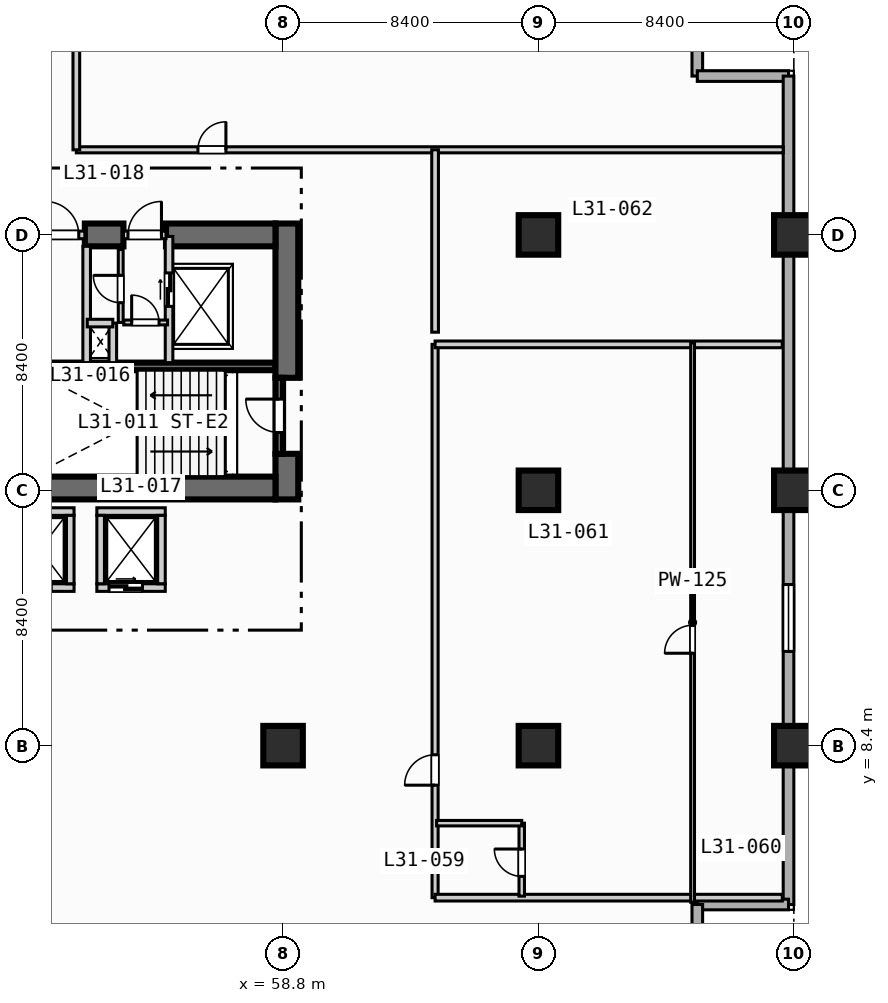
"""IFC4 building model, lengths in metres.
Left out: names, types, materials, properties, quantities, classifications, styles, units other than length and angle.
Written with IfcOpenShell. Run it as: python <this file> out.ifc"""

import sys

from ifc_helpers import new_model, si_unit, direction, frame, frame_2d, origin, origin_2d, place, context, subcontext, project, spatial, rectangle, extrude, element, fill, save


model = new_model("IFC4")
c1 = context("Model", 3, precision=1e-05, world=origin(), true_north=direction((0.0, 1.0)))
c2 = subcontext(c1, "Body", "Model", "MODEL_VIEW")
j1 = project(units=[si_unit("LENGTHUNIT", "METRE"), si_unit("PLANEANGLEUNIT", "RADIAN")], contexts=[c1])
p1 = place(None, origin())
s1 = spatial("IfcSite", under=j1, at=p1, CompositionType="ELEMENT")
p2 = place(p1, origin())
s2 = spatial("IfcBuilding", under=s1, at=p2, CompositionType="ELEMENT")
p3 = place(p2, frame((0.0, 0.0, 130.4)))
s3 = spatial("IfcBuildingStorey", under=s2, at=p3, CompositionType="ELEMENT", Elevation=130.4)
p4 = place(p3, frame((50.5, 20.875, 0.0), z_axis=(0.0, 0.0, 1.0), x_axis=(1.0, 0.0, 0.0)))
e1 = element("IfcWall", 1, at=p4, inside=s3, PredefinedType="SOLIDWALL", context=c2, shape_type="SweptSolid", body=[
    extrude(rectangle(XDim=8.05, YDim=0.25, at=frame_2d((4.025, 0.0))), origin(), (0.0, 0.0, 1.0), 3.55),
])
p5 = place(p3, frame((58.925, 16.5, 0.0), z_axis=(0.0, 0.0, 1.0), x_axis=(0.0, 1.0, 0.0)))
e2 = element("IfcWall", 2, at=p5, inside=s3, PredefinedType="SHEAR", context=c2, shape_type="SweptSolid", body=[
    extrude(rectangle(XDim=1.5, YDim=0.75, at=frame_2d((0.75, 0.0))), origin(), (0.0, 0.0, 1.0), 3.55),
])
p6 = place(p3, frame((58.925, 20.5, 0.0), z_axis=(0.0, 0.0, 1.0), x_axis=(0.0, 1.0, 0.0)))
e3 = element("IfcWall", 3, at=p6, inside=s3, PredefinedType="SHEAR", context=c2, shape_type="SweptSolid", body=[
    extrude(rectangle(XDim=5.075, YDim=0.75, at=frame_2d((2.538, 0.0))), origin(), (0.0, 0.0, 1.0), 3.55),
])
p7 = place(p3, frame((42.2, 16.875, 0.0), z_axis=(0.0, 0.0, 1.0), x_axis=(1.0, 0.0, 0.0)))
e4 = element("IfcWall", 4, at=p7, inside=s3, PredefinedType="SHEAR", context=c2, shape_type="SweptSolid", body=[
    extrude(rectangle(XDim=16.35, YDim=0.75, at=frame_2d((8.175, 0.0))), origin(), (0.0, 0.0, 1.0), 3.55),
])
p8 = place(p3, frame((52.28, 25.2, 0.0), z_axis=(0.0, 0.0, 1.0), x_axis=(1.0, 0.0, 0.0)))
e5 = element("IfcWall", 5, at=p8, inside=s3, PredefinedType="SHEAR", context=c2, shape_type="SweptSolid", body=[
    extrude(rectangle(XDim=1.27, YDim=0.75, at=frame_2d((0.635, 0.0))), origin(), (0.0, 0.0, 1.0), 3.55),
])
p9 = place(p3, frame((54.95, 25.2, 0.0), z_axis=(0.0, 0.0, 1.0), x_axis=(1.0, 0.0, 0.0)))
e6 = element("IfcWall", 6, at=p9, inside=s3, PredefinedType="SHEAR", context=c2, shape_type="SweptSolid", body=[
    extrude(rectangle(XDim=3.6, YDim=0.75, at=frame_2d((1.8, 0.0))), origin(), (0.0, 0.0, 1.0), 3.55),
])
for number, where, z_axis, x_axis in (
    (7, (58.8, 8.4, 0.0), (0.0, 0.0, 1.0), (1.0, 0.0, 0.0)),
    (8, (67.2, 8.4, 0.0), (0.0, 0.0, 1.0), (1.0, 0.0, 0.0)),
    (9, (67.2, 16.8, 0.0), (0.0, 0.0, 1.0), (1.0, 0.0, 0.0)),
    (10, (67.2, 25.2, 0.0), (0.0, 0.0, 1.0), (1.0, 0.0, 0.0)),
    (11, (75.6, 8.4, 0.0), (0.0, 0.0, 1.0), (1.0, 0.0, 0.0)),
    (12, (75.6, 16.8, 0.0), (0.0, 0.0, 1.0), (1.0, 0.0, 0.0)),
    (13, (75.6, 25.2, 0.0), (0.0, 0.0, 1.0), (1.0, 0.0, 0.0)),
):
    element("IfcColumn", number, at=place(p3, frame(where, z_axis=z_axis, x_axis=x_axis)), inside=s3, PredefinedType="COLUMN", context=c2, shape_type="SweptSolid", body=[
        extrude(rectangle(XDim=1.3, YDim=1.3, at=origin_2d()), origin(), (0.0, 0.0, 1.0), 3.8),
    ])
for number, where, z_axis, x_axis in (
    (14, (72.425, 33.425, 0.0), (0.0, 0.0, 1.0), (0.0, -1.0, 0.0)),
    (15, (72.425, 30.425, 0.0), (0.0, 0.0, 1.0), (1.0, 0.0, 0.0)),
):
    element("IfcWall", number, at=place(p3, frame(where, z_axis=z_axis, x_axis=x_axis)), inside=s3, PredefinedType="STANDARD", context=c2, shape_type="SweptSolid", body=[
        extrude(rectangle(XDim=3.0, YDim=0.35, at=frame_2d((1.5, 0.0))), origin(), (0.0, 0.0, 1.0), 3.55),
    ])
p10 = place(p3, frame((75.425, 30.425, 0.0), z_axis=(0.0, 0.0, 1.0), x_axis=(0.0, -1.0, 0.0)))
e16 = element("IfcWall", 16, at=p10, inside=s3, PredefinedType="STANDARD", context=c2, shape_type="SweptSolid", body=[
    extrude(rectangle(XDim=27.25, YDim=0.35, at=frame_2d((13.625, 0.0))), origin(), (0.0, 0.0, 1.0), 3.55),
])
p11 = place(p10, frame((16.725, 0.0, 0.85)))
e17 = element("IfcOpeningElement", 17, at=p11, cuts=e16, PredefinedType="OPENING", context=c2, shape_type="SweptSolid", body=[
    extrude(rectangle(XDim=2.2, YDim=1.8, at=frame_2d((1.1, 0.9))), frame((0.0, 0.185, 0.0), z_axis=(0.0, -1.0, 0.0), x_axis=(1.0, 0.0, 0.0)), (0.0, 0.0, 1.0), 0.37),
])
for number, where, z_axis, x_axis in (
    (18, (75.425, 3.175, 0.0), (0.0, 0.0, 1.0), (-1.0, 0.0, 0.0)),
    (19, (72.425, 3.175, 0.0), (0.0, 0.0, 1.0), (0.0, -1.0, 0.0)),
):
    element("IfcWall", number, at=place(p3, frame(where, z_axis=z_axis, x_axis=x_axis)), inside=s3, PredefinedType="STANDARD", context=c2, shape_type="SweptSolid", body=[
        extrude(rectangle(XDim=3.0, YDim=0.35, at=frame_2d((1.5, 0.0))), origin(), (0.0, 0.0, 1.0), 3.55),
    ])
p12 = place(p3, frame((58.675, 18.0, 0.0), z_axis=(0.0, 0.0, 1.0), x_axis=(0.0, 1.0, 0.0)))
e20 = element("IfcWall", 20, at=p12, inside=s3, PredefinedType="SOLIDWALL", context=c2, shape_type="SweptSolid", body=[
    extrude(rectangle(XDim=2.5, YDim=0.25, at=frame_2d((1.25, 0.0))), origin(), (0.0, 0.0, 1.0), 3.55),
])
p13 = place(p12, frame((0.7, 0.0, 0.0)))
e21 = element("IfcOpeningElement", 21, at=p13, cuts=e20, PredefinedType="OPENING", context=c2, shape_type="SweptSolid", body=[
    extrude(rectangle(XDim=1.1, YDim=2.15, at=frame_2d((0.55, 1.075))), frame((0.0, 0.135, 0.0), z_axis=(0.0, -1.0, 0.0), x_axis=(1.0, 0.0, 0.0)), (0.0, 0.0, 1.0), 0.27),
])
p14 = place(p3, frame((50.8, 25.2, 0.0), z_axis=(0.0, 0.0, 1.0), x_axis=(1.0, 0.0, 0.0)))
e22 = element("IfcWall", 22, at=p14, inside=s3, PredefinedType="SOLIDWALL", context=c2, shape_type="SweptSolid", body=[
    extrude(rectangle(XDim=1.48, YDim=0.25, at=frame_2d((0.74, 0.0))), origin(), (0.0, 0.0, 1.0), 3.55),
])
p15 = place(p14, frame((0.18, 0.0, 0.0)))
e23 = element("IfcOpeningElement", 23, at=p15, cuts=e22, PredefinedType="OPENING", context=c2, shape_type="SweptSolid", body=[
    extrude(rectangle(XDim=1.1, YDim=2.15, at=frame_2d((0.55, 1.075))), frame((0.0, 0.135, 0.0), z_axis=(0.0, -1.0, 0.0), x_axis=(1.0, 0.0, 0.0)), (0.0, 0.0, 1.0), 0.27),
])
p16 = place(p3, frame((52.34, 21.0, 0.0), z_axis=(0.0, 0.0, 1.0), x_axis=(0.0, 1.0, 0.0)))
e24 = element("IfcWall", 24, at=p16, inside=s3, PredefinedType="SOLIDWALL", context=c2, shape_type="SweptSolid", body=[
    extrude(rectangle(XDim=3.825, YDim=0.25, at=frame_2d((1.913, 0.0))), origin(), (0.0, 0.0, 1.0), 3.55),
])
p17 = place(p3, frame((55.05, 21.0, 0.0), z_axis=(0.0, 0.0, 1.0), x_axis=(0.0, 1.0, 0.0)))
e25 = element("IfcWall", 25, at=p17, inside=s3, PredefinedType="SOLIDWALL", context=c2, shape_type="SweptSolid", body=[
    extrude(rectangle(XDim=4.15, YDim=0.25, at=frame_2d((2.075, 0.0))), origin(), (0.0, 0.0, 1.0), 3.55),
])
p18 = place(p17, frame((1.85, 0.0, 0.0)))
e26 = element("IfcOpeningElement", 26, at=p18, cuts=e25, PredefinedType="OPENING", context=c2, shape_type="SweptSolid", body=[
    extrude(rectangle(XDim=1.1, YDim=2.15, at=frame_2d((0.55, 1.075))), frame((0.0, 0.135, 0.0), z_axis=(0.0, -1.0, 0.0), x_axis=(1.0, 0.0, 0.0)), (0.0, 0.0, 1.0), 0.27),
])
p19 = place(p3, frame((53.55, 25.2, 0.0), z_axis=(0.0, 0.0, 1.0), x_axis=(1.0, 0.0, 0.0)))
e27 = element("IfcWall", 27, at=p19, inside=s3, PredefinedType="SOLIDWALL", context=c2, shape_type="SweptSolid", body=[
    extrude(rectangle(XDim=1.4, YDim=0.25, at=frame_2d((0.7, 0.0))), origin(), (0.0, 0.0, 1.0), 3.55),
])
p20 = place(p19, frame((0.15, 0.0, 0.0)))
e28 = element("IfcOpeningElement", 28, at=p20, cuts=e27, PredefinedType="OPENING", context=c2, shape_type="SweptSolid", body=[
    extrude(rectangle(XDim=1.1, YDim=2.15, at=frame_2d((0.55, 1.075))), frame((0.0, 0.135, 0.0), z_axis=(0.0, -1.0, 0.0), x_axis=(1.0, 0.0, 0.0)), (0.0, 0.0, 1.0), 0.27),
])
p21 = place(p3, frame((53.2, 21.0, 0.0), z_axis=(0.0, 0.0, 1.0), x_axis=(0.0, 1.0, 0.0)))
e29 = element("IfcWall", 29, at=p21, inside=s3, PredefinedType="SOLIDWALL", context=c2, shape_type="SweptSolid", body=[
    extrude(rectangle(XDim=1.3, YDim=0.25, at=frame_2d((0.65, 0.0))), origin(), (0.0, 0.0, 1.0), 3.55),
])
p22 = place(p3, frame((52.36, 22.3, 0.0), z_axis=(0.0, 0.0, 1.0), x_axis=(1.0, 0.0, 0.0)))
e30 = element("IfcWall", 30, at=p22, inside=s3, PredefinedType="SOLIDWALL", context=c2, shape_type="SweptSolid", body=[
    extrude(rectangle(XDim=0.84, YDim=0.25, at=frame_2d((0.42, 0.0))), origin(), (0.0, 0.0, 1.0), 3.55),
])
p23 = place(p3, frame((53.56, 22.32, 0.0), z_axis=(0.0, 0.0, 1.0), x_axis=(1.0, 0.0, 0.0)))
e31 = element("IfcWall", 31, at=p23, inside=s3, PredefinedType="PARTITIONING", context=c2, shape_type="SweptSolid", body=[
    extrude(rectangle(XDim=1.44, YDim=0.16, at=frame_2d((0.72, 0.0))), origin(), (0.0, 0.0, 1.0), 3.55),
])
p24 = place(p23, frame((0.26, 0.0, 0.0)))
e32 = element("IfcOpeningElement", 32, at=p24, cuts=e31, PredefinedType="OPENING", context=c2, shape_type="SweptSolid", body=[
    extrude(rectangle(XDim=0.9, YDim=2.1, at=frame_2d((0.45, 1.05))), frame((0.0, 0.09, 0.0), z_axis=(0.0, -1.0, 0.0), x_axis=(1.0, 0.0, 0.0)), (0.0, 0.0, 1.0), 0.18),
])
p25 = place(p3, frame((53.46, 22.32, 0.0), z_axis=(0.0, 0.0, 1.0), x_axis=(0.0, 1.0, 0.0)))
e33 = element("IfcWall", 33, at=p25, inside=s3, PredefinedType="PARTITIONING", context=c2, shape_type="SweptSolid", body=[
    extrude(rectangle(XDim=2.4, YDim=0.16, at=frame_2d((1.2, 0.0))), origin(), (0.0, 0.0, 1.0), 3.55),
])
p26 = place(p25, frame((0.65, 0.0, 0.0)))
e34 = element("IfcOpeningElement", 34, at=p26, cuts=e33, PredefinedType="OPENING", context=c2, shape_type="SweptSolid", body=[
    extrude(rectangle(XDim=0.9, YDim=2.1, at=frame_2d((0.45, 1.05))), frame((0.0, 0.09, 0.0), z_axis=(0.0, -1.0, 0.0), x_axis=(1.0, 0.0, 0.0)), (0.0, 0.0, 1.0), 0.18),
])
p27 = place(p3, frame((49.675, 13.6, 0.0), z_axis=(0.0, 0.0, 1.0), x_axis=(1.0, 0.0, 0.0)))
e35 = element("IfcWall", 35, at=p27, inside=s3, PredefinedType="SOLIDWALL", context=c2, shape_type="SweptSolid", body=[
    extrude(rectangle(XDim=2.25, YDim=0.25, at=frame_2d((1.125, 0.0))), origin(), (0.0, 0.0, 1.0), 3.55),
])
p28 = place(p27, frame((0.4, 0.0, 0.0)))
e36 = element("IfcOpeningElement", 36, at=p28, cuts=e35, PredefinedType="OPENING", context=c2, shape_type="SweptSolid", body=[
    extrude(rectangle(XDim=1.1, YDim=2.15, at=frame_2d((0.55, 1.075))), frame((0.0, 0.135, 0.0), z_axis=(0.0, -1.0, 0.0), x_axis=(1.0, 0.0, 0.0)), (0.0, 0.0, 1.0), 0.27),
])
for number, where, z_axis, x_axis in (
    (37, (49.675, 16.1, 0.0), (0.0, 0.0, 1.0), (1.0, 0.0, 0.0)),
    (38, (51.8, 13.725, 0.0), (0.0, 0.0, 1.0), (0.0, 1.0, 0.0)),
):
    element("IfcWall", number, at=place(p3, frame(where, z_axis=z_axis, x_axis=x_axis)), inside=s3, PredefinedType="SOLIDWALL", context=c2, shape_type="SweptSolid", body=[
        extrude(rectangle(XDim=2.25, YDim=0.25, at=frame_2d((1.125, 0.0))), origin(), (0.0, 0.0, 1.0), 3.55),
    ])
p29 = place(p3, frame((52.675, 13.6, 0.0), z_axis=(0.0, 0.0, 1.0), x_axis=(1.0, 0.0, 0.0)))
e39 = element("IfcWall", 39, at=p29, inside=s3, PredefinedType="SOLIDWALL", context=c2, shape_type="SweptSolid", body=[
    extrude(rectangle(XDim=2.25, YDim=0.25, at=frame_2d((1.125, 0.0))), origin(), (0.0, 0.0, 1.0), 3.55),
])
p30 = place(p29, frame((0.4, 0.0, 0.0)))
e40 = element("IfcOpeningElement", 40, at=p30, cuts=e39, PredefinedType="OPENING", context=c2, shape_type="SweptSolid", body=[
    extrude(rectangle(XDim=1.1, YDim=2.15, at=frame_2d((0.55, 1.075))), frame((0.0, 0.135, 0.0), z_axis=(0.0, -1.0, 0.0), x_axis=(1.0, 0.0, 0.0)), (0.0, 0.0, 1.0), 0.27),
])
for number, where, z_axis, x_axis in (
    (41, (52.675, 16.1, 0.0), (0.0, 0.0, 1.0), (1.0, 0.0, 0.0)),
    (42, (52.8, 13.725, 0.0), (0.0, 0.0, 1.0), (0.0, 1.0, 0.0)),
    (43, (54.8, 13.725, 0.0), (0.0, 0.0, 1.0), (0.0, 1.0, 0.0)),
):
    element("IfcWall", number, at=place(p3, frame(where, z_axis=z_axis, x_axis=x_axis)), inside=s3, PredefinedType="SOLIDWALL", context=c2, shape_type="SweptSolid", body=[
        extrude(rectangle(XDim=2.25, YDim=0.25, at=frame_2d((1.125, 0.0))), origin(), (0.0, 0.0, 1.0), 3.55),
    ])
p31 = place(p3, frame((63.8, 3.4, 0.0), z_axis=(0.0, 0.0, 1.0), x_axis=(0.0, 1.0, 0.0)))
e44 = element("IfcWall", 44, at=p31, inside=s3, PredefinedType="PARTITIONING", context=c2, shape_type="SweptSolid", body=[
    extrude(rectangle(XDim=18.2, YDim=0.2, at=frame_2d((9.1, 0.0))), origin(), (0.0, 0.0, 1.0), 3.55),
])
p32 = place(p31, frame((3.7, 0.0, 0.0)))
e45 = element("IfcOpeningElement", 45, at=p32, cuts=e44, PredefinedType="OPENING", context=c2, shape_type="SweptSolid", body=[
    extrude(rectangle(XDim=1.0, YDim=2.15, at=frame_2d((0.5, 1.075))), frame((0.0, 0.11, 0.0), z_axis=(0.0, -1.0, 0.0), x_axis=(1.0, 0.0, 0.0)), (0.0, 0.0, 1.0), 0.22),
])
for number, where, z_axis, x_axis in (
    (46, (63.8, 3.4, 0.0), (0.0, 0.0, 1.0), (1.0, 0.0, 0.0)),
    (47, (63.8, 21.6, 0.0), (0.0, 0.0, 1.0), (1.0, 0.0, 0.0)),
):
    element("IfcWall", number, at=place(p3, frame(where, z_axis=z_axis, x_axis=x_axis)), inside=s3, PredefinedType="PARTITIONING", context=c2, shape_type="SweptSolid", body=[
        extrude(rectangle(XDim=11.42, YDim=0.22, at=frame_2d((5.71, 0.0))), origin(), (0.0, 0.0, 1.0), 3.55),
    ])
p33 = place(p3, frame((66.65, 3.45, 0.0), z_axis=(0.0, 0.0, 1.0), x_axis=(0.0, 1.0, 0.0)))
e48 = element("IfcWall", 48, at=p33, inside=s3, PredefinedType="PLUMBINGWALL", context=c2, shape_type="SweptSolid", body=[
    extrude(rectangle(XDim=2.4, YDim=0.18, at=frame_2d((1.2, 0.0))), origin(), (0.0, 0.0, 1.0), 3.55),
])
p34 = place(p33, frame((0.65, 0.0, 0.0)))
e49 = element("IfcOpeningElement", 49, at=p34, cuts=e48, PredefinedType="OPENING", context=c2, shape_type="SweptSolid", body=[
    extrude(rectangle(XDim=0.9, YDim=2.1, at=frame_2d((0.45, 1.05))), frame((0.0, 0.1, 0.0), z_axis=(0.0, -1.0, 0.0), x_axis=(1.0, 0.0, 0.0)), (0.0, 0.0, 1.0), 0.2),
])
p35 = place(p3, frame((63.85, 5.85, 0.0), z_axis=(0.0, 0.0, 1.0), x_axis=(1.0, 0.0, 0.0)))
e50 = element("IfcWall", 50, at=p35, inside=s3, PredefinedType="PLUMBINGWALL", context=c2, shape_type="SweptSolid", body=[
    extrude(rectangle(XDim=2.8, YDim=0.18, at=frame_2d((1.4, 0.0))), origin(), (0.0, 0.0, 1.0), 3.55),
])
p36 = place(p3, frame((72.27, 3.25, 0.0), z_axis=(0.0, 0.0, 1.0), x_axis=(0.0, 1.0, 0.0)))
e51 = element("IfcWall", 51, at=p36, inside=s3, PredefinedType="PARTITIONING", context=c2, shape_type="SweptSolid", body=[
    extrude(rectangle(XDim=18.4, YDim=0.125, at=frame_2d((9.2, 0.0))), origin(), (0.0, 0.0, 1.0), 3.55),
])
p37 = place(p36, frame((8.19, 0.0, 0.0)))
e52 = element("IfcOpeningElement", 52, at=p37, cuts=e51, PredefinedType="OPENING", context=c2, shape_type="SweptSolid", body=[
    extrude(rectangle(XDim=0.92, YDim=2.1, at=frame_2d((0.46, 1.05))), frame((0.0, 0.073, 0.0), z_axis=(0.0, -1.0, 0.0), x_axis=(1.0, 0.0, 0.0)), (0.0, 0.0, 1.0), 0.145),
])
p38 = place(p3, frame((52.0, 28.0, 0.0), z_axis=(0.0, 0.0, 1.0), x_axis=(1.0, 0.0, 0.0)))
e53 = element("IfcWall", 53, at=p38, inside=s3, PredefinedType="PARTITIONING", context=c2, shape_type="SweptSolid", body=[
    extrude(rectangle(XDim=23.25, YDim=0.2, at=frame_2d((11.625, 0.0))), origin(), (0.0, 0.0, 1.0), 3.55),
])
p39 = place(p38, frame((4.0, 0.0, 0.0)))
e54 = element("IfcOpeningElement", 54, at=p39, cuts=e53, PredefinedType="OPENING", context=c2, shape_type="SweptSolid", body=[
    extrude(rectangle(XDim=0.92, YDim=2.1, at=frame_2d((0.46, 1.05))), frame((0.0, 0.11, 0.0), z_axis=(0.0, -1.0, 0.0), x_axis=(1.0, 0.0, 0.0)), (0.0, 0.0, 1.0), 0.22),
])
p40 = place(p3, frame((52.0, 28.0, 0.0), z_axis=(0.0, 0.0, 1.0), x_axis=(0.0, 1.0, 0.0)))
e55 = element("IfcWall", 55, at=p40, inside=s3, PredefinedType="PARTITIONING", context=c2, shape_type="SweptSolid", body=[
    extrude(rectangle(XDim=5.3, YDim=0.22, at=frame_2d((2.65, 0.0))), origin(), (0.0, 0.0, 1.0), 3.55),
])
p41 = place(p3, frame((63.8, 22.0, 0.0), z_axis=(0.0, 0.0, 1.0), x_axis=(0.0, 1.0, 0.0)))
e56 = element("IfcWall", 56, at=p41, inside=s3, PredefinedType="PARTITIONING", context=c2, shape_type="SweptSolid", body=[
    extrude(rectangle(XDim=6.0, YDim=0.22, at=frame_2d((3.0, 0.0))), origin(), (0.0, 0.0, 1.0), 3.55),
])
p42 = place(p11, origin())
e57 = element("IfcWindow", 57, at=p42, inside=s3, PartitioningType="SINGLE_PANEL", PredefinedType="WINDOW", context=c2, shape_type="SweptSolid", body=[
    extrude(rectangle(XDim=2.2, YDim=1.8, at=frame_2d((1.1, 0.9))), frame((0.0, 0.03, 0.0), z_axis=(0.0, -1.0, 0.0), x_axis=(1.0, 0.0, 0.0)), (0.0, 0.0, 1.0), 0.06),
])
fill(e17, e57)
p43 = place(p13, origin())
e58 = element("IfcDoor", 58, at=p43, inside=s3, OperationType="SINGLE_SWING_RIGHT", PredefinedType="DOOR", context=c2, shape_type="SweptSolid", body=[
    extrude(rectangle(XDim=1.1, YDim=2.15, at=frame_2d((0.55, 1.075))), frame((0.0, 0.025, 0.0), z_axis=(0.0, -1.0, 0.0), x_axis=(1.0, 0.0, 0.0)), (0.0, 0.0, 1.0), 0.05),
])
fill(e21, e58)
p44 = place(p15, origin())
e59 = element("IfcDoor", 59, at=p44, inside=s3, OperationType="SINGLE_SWING_LEFT", PredefinedType="DOOR", context=c2, shape_type="SweptSolid", body=[
    extrude(rectangle(XDim=1.1, YDim=2.15, at=frame_2d((0.55, 1.075))), frame((0.0, 0.025, 0.0), z_axis=(0.0, -1.0, 0.0), x_axis=(1.0, 0.0, 0.0)), (0.0, 0.0, 1.0), 0.05),
])
fill(e23, e59)
p45 = place(p18, origin())
e60 = element("IfcDoor", 60, at=p45, inside=s3, OperationType="SLIDING_TO_LEFT", PredefinedType="DOOR", context=c2, shape_type="SweptSolid", body=[
    extrude(rectangle(XDim=1.1, YDim=2.15, at=frame_2d((0.55, 1.075))), frame((0.0, 0.025, 0.0), z_axis=(0.0, -1.0, 0.0), x_axis=(1.0, 0.0, 0.0)), (0.0, 0.0, 1.0), 0.05),
])
fill(e26, e60)
p46 = place(p20, origin())
e61 = element("IfcDoor", 61, at=p46, inside=s3, OperationType="SINGLE_SWING_RIGHT", PredefinedType="DOOR", context=c2, shape_type="SweptSolid", body=[
    extrude(rectangle(XDim=1.1, YDim=2.15, at=frame_2d((0.55, 1.075))), frame((0.0, 0.025, 0.0), z_axis=(0.0, -1.0, 0.0), x_axis=(1.0, 0.0, 0.0)), (0.0, 0.0, 1.0), 0.05),
])
fill(e28, e61)
p47 = place(p24, origin())
e62 = element("IfcDoor", 62, at=p47, inside=s3, OperationType="SINGLE_SWING_LEFT", PredefinedType="DOOR", context=c2, shape_type="SweptSolid", body=[
    extrude(rectangle(XDim=0.9, YDim=2.1, at=frame_2d((0.45, 1.05))), frame((0.0, 0.025, 0.0), z_axis=(0.0, -1.0, 0.0), x_axis=(1.0, 0.0, 0.0)), (0.0, 0.0, 1.0), 0.05),
])
fill(e32, e62)
p48 = place(p26, origin())
e63 = element("IfcDoor", 63, at=p48, inside=s3, OperationType="SINGLE_SWING_RIGHT", PredefinedType="DOOR", context=c2, shape_type="SweptSolid", body=[
    extrude(rectangle(XDim=0.9, YDim=2.1, at=frame_2d((0.45, 1.05))), frame((0.0, 0.025, 0.0), z_axis=(0.0, -1.0, 0.0), x_axis=(1.0, 0.0, 0.0)), (0.0, 0.0, 1.0), 0.05),
])
fill(e34, e63)
p49 = place(p30, origin())
e64 = element("IfcDoor", 64, at=p49, inside=s3, OperationType="SLIDING_TO_LEFT", PredefinedType="DOOR", context=c2, shape_type="SweptSolid", body=[
    extrude(rectangle(XDim=1.1, YDim=2.15, at=frame_2d((0.55, 1.075))), frame((0.0, 0.025, 0.0), z_axis=(0.0, -1.0, 0.0), x_axis=(1.0, 0.0, 0.0)), (0.0, 0.0, 1.0), 0.05),
])
fill(e40, e64)
p50 = place(p32, origin())
e65 = element("IfcDoor", 65, at=p50, inside=s3, OperationType="SINGLE_SWING_LEFT", PredefinedType="DOOR", context=c2, shape_type="SweptSolid", body=[
    extrude(rectangle(XDim=1.0, YDim=2.15, at=frame_2d((0.5, 1.075))), frame((0.0, 0.025, 0.0), z_axis=(0.0, -1.0, 0.0), x_axis=(1.0, 0.0, 0.0)), (0.0, 0.0, 1.0), 0.05),
])
fill(e45, e65)
p51 = place(p34, origin())
e66 = element("IfcDoor", 66, at=p51, inside=s3, OperationType="SINGLE_SWING_RIGHT", PredefinedType="DOOR", context=c2, shape_type="SweptSolid", body=[
    extrude(rectangle(XDim=0.9, YDim=2.1, at=frame_2d((0.45, 1.05))), frame((0.0, 0.025, 0.0), z_axis=(0.0, -1.0, 0.0), x_axis=(1.0, 0.0, 0.0)), (0.0, 0.0, 1.0), 0.05),
])
fill(e49, e66)
p52 = place(p37, origin())
e67 = element("IfcDoor", 67, at=p52, inside=s3, OperationType="SINGLE_SWING_LEFT", PredefinedType="DOOR", context=c2, shape_type="SweptSolid", body=[
    extrude(rectangle(XDim=0.92, YDim=2.1, at=frame_2d((0.46, 1.05))), frame((0.0, 0.025, 0.0), z_axis=(0.0, -1.0, 0.0), x_axis=(1.0, 0.0, 0.0)), (0.0, 0.0, 1.0), 0.05),
])
fill(e52, e67)
p53 = place(p39, origin())
e68 = element("IfcDoor", 68, at=p53, inside=s3, OperationType="SINGLE_SWING_RIGHT", PredefinedType="DOOR", context=c2, shape_type="SweptSolid", body=[
    extrude(rectangle(XDim=0.92, YDim=2.1, at=frame_2d((0.46, 1.05))), frame((0.0, 0.025, 0.0), z_axis=(0.0, -1.0, 0.0), x_axis=(1.0, 0.0, 0.0)), (0.0, 0.0, 1.0), 0.05),
])
fill(e54, e68)
save(model, sys.argv[1])
